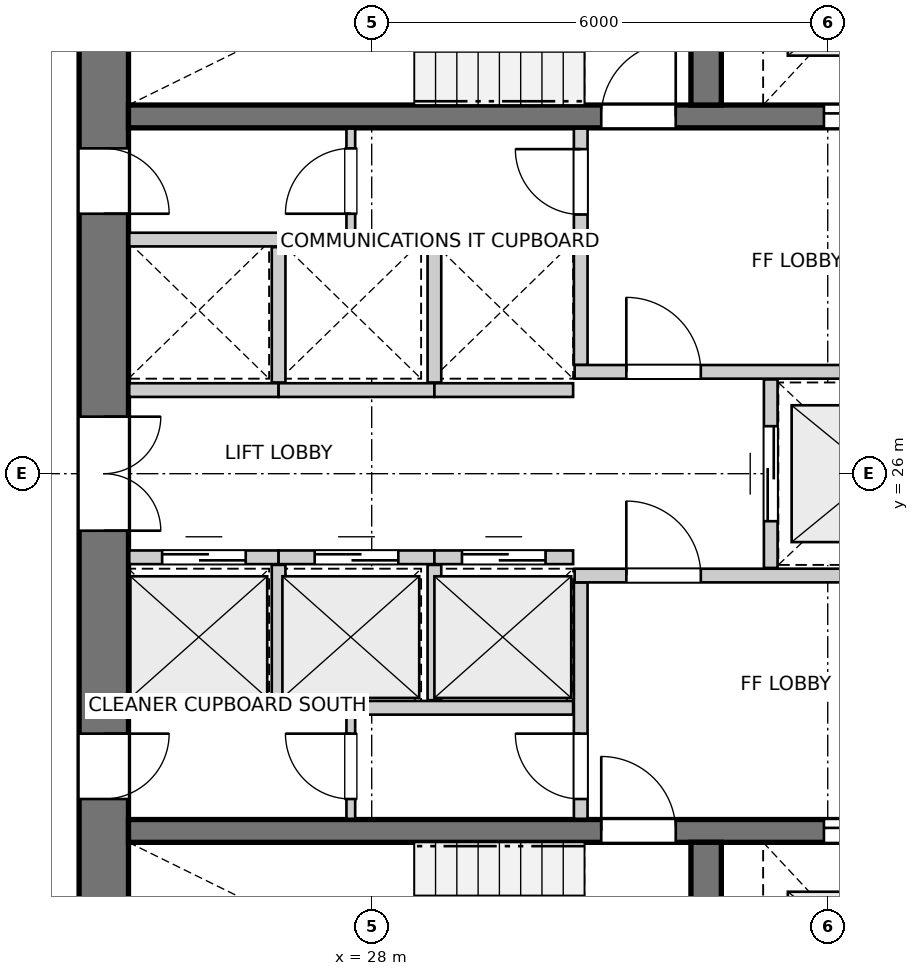
"""IFC4 building model, lengths in metres.
Left out: names, types, materials, properties, quantities, classifications, styles, units other than length and angle.
Written with IfcOpenShell. Run it as: python <this file> out.ifc"""

import sys

from ifc_helpers import new_model, si_unit, direction, frame, frame_2d, origin, place, context, subcontext, project, spatial, rectangle, extrude, source, transform, mapped, element, fill, save


model = new_model("IFC4")
c1 = context("Model", 3, precision=1e-05, world=origin(), true_north=direction((0.0, 1.0)))
c2 = subcontext(c1, "Body", "Model", "MODEL_VIEW")
j1 = project(units=[si_unit("LENGTHUNIT", "METRE"), si_unit("PLANEANGLEUNIT", "RADIAN")], contexts=[c1])
p1 = place(None, origin())
s1 = spatial("IfcSite", under=j1, at=p1, CompositionType="ELEMENT")
p2 = place(p1, origin())
s2 = spatial("IfcBuilding", under=s1, at=p2, CompositionType="ELEMENT")
p3 = place(p2, frame((0.0, 0.0, 86.4)))
s3 = spatial("IfcBuildingStorey", under=s2, at=p3, CompositionType="ELEMENT", Elevation=86.4)
p4 = place(p3, frame((24.475, 33.8, 0.0), z_axis=(0.0, 0.0, 1.0), x_axis=(0.0, -1.0, 0.0)))
e1 = element("IfcWall", 1, at=p4, inside=s3, PredefinedType="SHEAR", context=c2, shape_type="SweptSolid", body=[
    extrude(rectangle(XDim=15.6, YDim=0.65, at=frame_2d((7.8, 0.0))), origin(), (0.0, 0.0, 1.0), 2.95),
])
p5 = place(p4, frame((7.05, 0.0, 0.0)))
e2 = element("IfcOpeningElement", 2, at=p5, cuts=e1, PredefinedType="OPENING", context=c2, shape_type="SweptSolid", body=[
    extrude(rectangle(XDim=1.5, YDim=2.15, at=frame_2d((0.75, 1.075))), frame((0.0, 0.335, 0.0), z_axis=(0.0, -1.0, 0.0), x_axis=(1.0, 0.0, 0.0)), (0.0, 0.0, 1.0), 0.67),
])
p6 = place(p4, frame((3.52, 0.0, 0.0)))
e3 = element("IfcOpeningElement", 3, at=p6, cuts=e1, PredefinedType="OPENING", context=c2, shape_type="SweptSolid", body=[
    extrude(rectangle(XDim=0.86, YDim=2.05, at=frame_2d((0.43, 1.025))), frame((0.0, 0.335, 0.0), z_axis=(0.0, -1.0, 0.0), x_axis=(1.0, 0.0, 0.0)), (0.0, 0.0, 1.0), 0.67),
])
p7 = place(p4, frame((11.22, 0.0, 0.0)))
e4 = element("IfcOpeningElement", 4, at=p7, cuts=e1, PredefinedType="OPENING", context=c2, shape_type="SweptSolid", body=[
    extrude(rectangle(XDim=0.86, YDim=2.05, at=frame_2d((0.43, 1.025))), frame((0.0, 0.335, 0.0), z_axis=(0.0, -1.0, 0.0), x_axis=(1.0, 0.0, 0.0)), (0.0, 0.0, 1.0), 0.67),
])
p8 = place(p3, frame((24.8, 21.3, 0.0), z_axis=(0.0, 0.0, 1.0), x_axis=(1.0, 0.0, 0.0)))
e5 = element("IfcWall", 5, at=p8, inside=s3, PredefinedType="SHEAR", context=c2, shape_type="SweptSolid", body=[
    extrude(rectangle(XDim=11.1, YDim=0.3, at=frame_2d((5.55, 0.0))), origin(), (0.0, 0.0, 1.0), 2.95),
])
p9 = place(p8, frame((6.22, 0.0, 0.0)))
e6 = element("IfcOpeningElement", 6, at=p9, cuts=e5, PredefinedType="OPENING", context=c2, shape_type="SweptSolid", body=[
    extrude(rectangle(XDim=0.98, YDim=2.15, at=frame_2d((0.49, 1.075))), frame((0.0, 0.16, 0.0), z_axis=(0.0, -1.0, 0.0), x_axis=(1.0, 0.0, 0.0)), (0.0, 0.0, 1.0), 0.32),
])
p10 = place(p8, frame((9.15, 0.0, 0.0)))
e7 = element("IfcOpeningElement", 7, at=p10, cuts=e5, PredefinedType="OPENING", context=c2, shape_type="SweptSolid", body=[
    extrude(rectangle(XDim=1.15, YDim=2.15, at=frame_2d((0.575, 1.075))), frame((0.0, 0.16, 0.0), z_axis=(0.0, -1.0, 0.0), x_axis=(1.0, 0.0, 0.0)), (0.0, 0.0, 1.0), 0.32),
])
p11 = place(p3, frame((32.4, 18.2, 0.0), z_axis=(0.0, 0.0, 1.0), x_axis=(0.0, 1.0, 0.0)))
e8 = element("IfcWall", 8, at=p11, inside=s3, PredefinedType="SHEAR", context=c2, shape_type="SweptSolid", body=[
    extrude(rectangle(XDim=2.95, YDim=0.4, at=frame_2d((1.475, 0.0))), origin(), (0.0, 0.0, 1.0), 2.95),
])
p12 = place(p3, frame((24.8, 30.7, 0.0), z_axis=(0.0, 0.0, 1.0), x_axis=(1.0, 0.0, 0.0)))
e9 = element("IfcWall", 9, at=p12, inside=s3, PredefinedType="SHEAR", context=c2, shape_type="SweptSolid", body=[
    extrude(rectangle(XDim=11.1, YDim=0.3, at=frame_2d((5.55, 0.0))), origin(), (0.0, 0.0, 1.0), 2.95),
])
p13 = place(p12, frame((6.22, 0.0, 0.0)))
e10 = element("IfcOpeningElement", 10, at=p13, cuts=e9, PredefinedType="OPENING", context=c2, shape_type="SweptSolid", body=[
    extrude(rectangle(XDim=0.98, YDim=2.15, at=frame_2d((0.49, 1.075))), frame((0.0, 0.16, 0.0), z_axis=(0.0, -1.0, 0.0), x_axis=(1.0, 0.0, 0.0)), (0.0, 0.0, 1.0), 0.32),
])
p14 = place(p12, frame((9.15, 0.0, 0.0)))
e11 = element("IfcOpeningElement", 11, at=p14, cuts=e9, PredefinedType="OPENING", context=c2, shape_type="SweptSolid", body=[
    extrude(rectangle(XDim=1.15, YDim=2.15, at=frame_2d((0.575, 1.075))), frame((0.0, 0.16, 0.0), z_axis=(0.0, -1.0, 0.0), x_axis=(1.0, 0.0, 0.0)), (0.0, 0.0, 1.0), 0.32),
])
p15 = place(p3, frame((32.4, 30.85, 0.0), z_axis=(0.0, 0.0, 1.0), x_axis=(0.0, 1.0, 0.0)))
e12 = element("IfcWall", 12, at=p15, inside=s3, PredefinedType="SHEAR", context=c2, shape_type="SweptSolid", body=[
    extrude(rectangle(XDim=2.95, YDim=0.4, at=frame_2d((1.475, 0.0))), origin(), (0.0, 0.0, 1.0), 2.95),
])
p16 = place(p3, frame((30.75, 21.46, 0.0), z_axis=(0.0, 0.0, 1.0), x_axis=(0.0, 1.0, 0.0)))
e13 = element("IfcWall", 13, at=p16, inside=s3, PredefinedType="PARTITIONING", context=c2, shape_type="SweptSolid", body=[
    extrude(rectangle(XDim=3.11, YDim=0.18, at=frame_2d((1.555, 0.0))), origin(), (0.0, 0.0, 1.0), 2.95),
])
p17 = place(p16, frame((0.26, 0.0, 0.0)))
e14 = element("IfcOpeningElement", 14, at=p17, cuts=e13, PredefinedType="OPENING", context=c2, shape_type="SweptSolid", body=[
    extrude(rectangle(XDim=0.86, YDim=2.05, at=frame_2d((0.43, 1.025))), frame((0.0, 0.1, 0.0), z_axis=(0.0, -1.0, 0.0), x_axis=(1.0, 0.0, 0.0)), (0.0, 0.0, 1.0), 0.2),
])
p18 = place(p3, frame((30.67, 24.66, 0.0), z_axis=(0.0, 0.0, 1.0), x_axis=(1.0, 0.0, 0.0)))
e15 = element("IfcWall", 15, at=p18, inside=s3, PredefinedType="PARTITIONING", context=c2, shape_type="SweptSolid", body=[
    extrude(rectangle(XDim=5.22, YDim=0.18, at=frame_2d((2.61, 0.0))), origin(), (0.0, 0.0, 1.0), 2.95),
])
p19 = place(p18, frame((0.68, 0.0, 0.0)))
e16 = element("IfcOpeningElement", 16, at=p19, cuts=e15, PredefinedType="OPENING", context=c2, shape_type="SweptSolid", body=[
    extrude(rectangle(XDim=0.98, YDim=2.15, at=frame_2d((0.49, 1.075))), frame((0.0, 0.1, 0.0), z_axis=(0.0, -1.0, 0.0), x_axis=(1.0, 0.0, 0.0)), (0.0, 0.0, 1.0), 0.2),
])
p20 = place(p3, frame((30.75, 27.43, 0.0), z_axis=(0.0, 0.0, 1.0), x_axis=(0.0, 1.0, 0.0)))
e17 = element("IfcWall", 17, at=p20, inside=s3, PredefinedType="PARTITIONING", context=c2, shape_type="SweptSolid", body=[
    extrude(rectangle(XDim=3.11, YDim=0.18, at=frame_2d((1.555, 0.0))), origin(), (0.0, 0.0, 1.0), 2.95),
])
p21 = place(p20, frame((1.98, 0.0, 0.0)))
e18 = element("IfcOpeningElement", 18, at=p21, cuts=e17, PredefinedType="OPENING", context=c2, shape_type="SweptSolid", body=[
    extrude(rectangle(XDim=0.86, YDim=2.05, at=frame_2d((0.43, 1.025))), frame((0.0, 0.1, 0.0), z_axis=(0.0, -1.0, 0.0), x_axis=(1.0, 0.0, 0.0)), (0.0, 0.0, 1.0), 0.2),
])
p22 = place(p3, frame((30.67, 27.34, 0.0), z_axis=(0.0, 0.0, 1.0), x_axis=(1.0, 0.0, 0.0)))
e19 = element("IfcWall", 19, at=p22, inside=s3, PredefinedType="PARTITIONING", context=c2, shape_type="SweptSolid", body=[
    extrude(rectangle(XDim=5.22, YDim=0.18, at=frame_2d((2.61, 0.0))), origin(), (0.0, 0.0, 1.0), 2.95),
])
p23 = place(p22, frame((0.68, 0.0, 0.0)))
e20 = element("IfcOpeningElement", 20, at=p23, cuts=e19, PredefinedType="OPENING", context=c2, shape_type="SweptSolid", body=[
    extrude(rectangle(XDim=0.98, YDim=2.15, at=frame_2d((0.49, 1.075))), frame((0.0, 0.1, 0.0), z_axis=(0.0, -1.0, 0.0), x_axis=(1.0, 0.0, 0.0)), (0.0, 0.0, 1.0), 0.2),
])
p24 = place(p3, frame((33.25, 24.76, 0.0), z_axis=(0.0, 0.0, 1.0), x_axis=(0.0, 1.0, 0.0)))
e21 = element("IfcWall", 21, at=p24, inside=s3, PredefinedType="PARTITIONING", context=c2, shape_type="SweptSolid", body=[
    extrude(rectangle(XDim=2.48, YDim=0.18, at=frame_2d((1.24, 0.0))), origin(), (0.0, 0.0, 1.0), 2.95),
])
p25 = place(p24, frame((0.615, 0.0, 0.0)))
e22 = element("IfcOpeningElement", 22, at=p25, cuts=e21, PredefinedType="OPENING", context=c2, shape_type="SweptSolid", body=[
    extrude(rectangle(XDim=1.25, YDim=2.15, at=frame_2d((0.625, 1.075))), frame((0.0, 0.1, 0.0), z_axis=(0.0, -1.0, 0.0), x_axis=(1.0, 0.0, 0.0)), (0.0, 0.0, 1.0), 0.2),
])
p26 = place(p3, frame((24.81, 22.92, 0.0), z_axis=(0.0, 0.0, 1.0), x_axis=(1.0, 0.0, 0.0)))
e23 = element("IfcWall", 23, at=p26, inside=s3, PredefinedType="PARTITIONING", context=c2, shape_type="SweptSolid", body=[
    extrude(rectangle(XDim=5.84, YDim=0.18, at=frame_2d((2.92, 0.0))), origin(), (0.0, 0.0, 1.0), 2.95),
])
p27 = place(p3, frame((24.81, 24.9, 0.0), z_axis=(0.0, 0.0, 1.0), x_axis=(1.0, 0.0, 0.0)))
e24 = element("IfcWall", 24, at=p27, inside=s3, PredefinedType="PARTITIONING", context=c2, shape_type="SweptSolid", body=[
    extrude(rectangle(XDim=1.965, YDim=0.18, at=frame_2d((0.982, 0.0))), origin(), (0.0, 0.0, 1.0), 2.95),
])
p28 = place(p27, frame((0.433, 0.0, 0.0)))
e25 = element("IfcOpeningElement", 25, at=p28, cuts=e24, PredefinedType="OPENING", context=c2, shape_type="SweptSolid", body=[
    extrude(rectangle(XDim=1.1, YDim=2.15, at=frame_2d((0.55, 1.075))), frame((0.0, 0.1, 0.0), z_axis=(0.0, -1.0, 0.0), x_axis=(1.0, 0.0, 0.0)), (0.0, 0.0, 1.0), 0.2),
])
p29 = place(p3, frame((26.775, 24.9, 0.0), z_axis=(0.0, 0.0, 1.0), x_axis=(1.0, 0.0, 0.0)))
e26 = element("IfcWall", 26, at=p29, inside=s3, PredefinedType="PARTITIONING", context=c2, shape_type="SweptSolid", body=[
    extrude(rectangle(XDim=2.05, YDim=0.18, at=frame_2d((1.025, 0.0))), origin(), (0.0, 0.0, 1.0), 2.95),
])
p30 = place(p29, frame((0.475, 0.0, 0.0)))
e27 = element("IfcOpeningElement", 27, at=p30, cuts=e26, PredefinedType="OPENING", context=c2, shape_type="SweptSolid", body=[
    extrude(rectangle(XDim=1.1, YDim=2.15, at=frame_2d((0.55, 1.075))), frame((0.0, 0.1, 0.0), z_axis=(0.0, -1.0, 0.0), x_axis=(1.0, 0.0, 0.0)), (0.0, 0.0, 1.0), 0.2),
])
p31 = place(p3, frame((26.775, 23.02, 0.0), z_axis=(0.0, 0.0, 1.0), x_axis=(0.0, 1.0, 0.0)))
e28 = element("IfcWall", 28, at=p31, inside=s3, PredefinedType="PARTITIONING", context=c2, shape_type="SweptSolid", body=[
    extrude(rectangle(XDim=1.78, YDim=0.18, at=frame_2d((0.89, 0.0))), origin(), (0.0, 0.0, 1.0), 2.95),
])
p32 = place(p3, frame((28.825, 24.9, 0.0), z_axis=(0.0, 0.0, 1.0), x_axis=(1.0, 0.0, 0.0)))
e29 = element("IfcWall", 29, at=p32, inside=s3, PredefinedType="PARTITIONING", context=c2, shape_type="SweptSolid", body=[
    extrude(rectangle(XDim=1.825, YDim=0.18, at=frame_2d((0.913, 0.0))), origin(), (0.0, 0.0, 1.0), 2.95),
])
p33 = place(p32, frame((0.363, 0.0, 0.0)))
e30 = element("IfcOpeningElement", 30, at=p33, cuts=e29, PredefinedType="OPENING", context=c2, shape_type="SweptSolid", body=[
    extrude(rectangle(XDim=1.1, YDim=2.15, at=frame_2d((0.55, 1.075))), frame((0.0, 0.1, 0.0), z_axis=(0.0, -1.0, 0.0), x_axis=(1.0, 0.0, 0.0)), (0.0, 0.0, 1.0), 0.2),
])
p34 = place(p3, frame((28.825, 23.02, 0.0), z_axis=(0.0, 0.0, 1.0), x_axis=(0.0, 1.0, 0.0)))
e31 = element("IfcWall", 31, at=p34, inside=s3, PredefinedType="PARTITIONING", context=c2, shape_type="SweptSolid", body=[
    extrude(rectangle(XDim=1.78, YDim=0.18, at=frame_2d((0.89, 0.0))), origin(), (0.0, 0.0, 1.0), 2.95),
])
p35 = place(p3, frame((24.81, 29.08, 0.0), z_axis=(0.0, 0.0, 1.0), x_axis=(1.0, 0.0, 0.0)))
e32 = element("IfcWall", 32, at=p35, inside=s3, PredefinedType="PARTITIONING", context=c2, shape_type="SweptSolid", body=[
    extrude(rectangle(XDim=5.84, YDim=0.18, at=frame_2d((2.92, 0.0))), origin(), (0.0, 0.0, 1.0), 2.95),
])
p36 = place(p3, frame((24.81, 27.1, 0.0), z_axis=(0.0, 0.0, 1.0), x_axis=(1.0, 0.0, 0.0)))
e33 = element("IfcWall", 33, at=p36, inside=s3, PredefinedType="PARTITIONING", context=c2, shape_type="SweptSolid", body=[
    extrude(rectangle(XDim=1.965, YDim=0.18, at=frame_2d((0.982, 0.0))), origin(), (0.0, 0.0, 1.0), 2.95),
])
p37 = place(p3, frame((26.775, 27.1, 0.0), z_axis=(0.0, 0.0, 1.0), x_axis=(1.0, 0.0, 0.0)))
e34 = element("IfcWall", 34, at=p37, inside=s3, PredefinedType="PARTITIONING", context=c2, shape_type="SweptSolid", body=[
    extrude(rectangle(XDim=2.05, YDim=0.18, at=frame_2d((1.025, 0.0))), origin(), (0.0, 0.0, 1.0), 2.95),
])
p38 = place(p3, frame((26.775, 27.2, 0.0), z_axis=(0.0, 0.0, 1.0), x_axis=(0.0, 1.0, 0.0)))
e35 = element("IfcWall", 35, at=p38, inside=s3, PredefinedType="PARTITIONING", context=c2, shape_type="SweptSolid", body=[
    extrude(rectangle(XDim=1.78, YDim=0.18, at=frame_2d((0.89, 0.0))), origin(), (0.0, 0.0, 1.0), 2.95),
])
p39 = place(p3, frame((28.825, 27.1, 0.0), z_axis=(0.0, 0.0, 1.0), x_axis=(1.0, 0.0, 0.0)))
e36 = element("IfcWall", 36, at=p39, inside=s3, PredefinedType="PARTITIONING", context=c2, shape_type="SweptSolid", body=[
    extrude(rectangle(XDim=1.825, YDim=0.18, at=frame_2d((0.913, 0.0))), origin(), (0.0, 0.0, 1.0), 2.95),
])
p40 = place(p3, frame((28.825, 27.2, 0.0), z_axis=(0.0, 0.0, 1.0), x_axis=(0.0, 1.0, 0.0)))
e37 = element("IfcWall", 37, at=p40, inside=s3, PredefinedType="PARTITIONING", context=c2, shape_type="SweptSolid", body=[
    extrude(rectangle(XDim=1.78, YDim=0.18, at=frame_2d((0.89, 0.0))), origin(), (0.0, 0.0, 1.0), 2.95),
])
p41 = place(p3, frame((27.725, 21.46, 0.0), z_axis=(0.0, 0.0, 1.0), x_axis=(0.0, 1.0, 0.0)))
e38 = element("IfcWall", 38, at=p41, inside=s3, PredefinedType="PARTITIONING", context=c2, shape_type="SweptSolid", body=[
    extrude(rectangle(XDim=1.38, YDim=0.115, at=frame_2d((0.69, 0.0))), origin(), (0.0, 0.0, 1.0), 2.95),
])
p42 = place(p41, frame((0.26, 0.0, 0.0)))
e39 = element("IfcOpeningElement", 39, at=p42, cuts=e38, PredefinedType="OPENING", context=c2, shape_type="SweptSolid", body=[
    extrude(rectangle(XDim=0.86, YDim=2.05, at=frame_2d((0.43, 1.025))), frame((0.0, 0.067, 0.0), z_axis=(0.0, -1.0, 0.0), x_axis=(1.0, 0.0, 0.0)), (0.0, 0.0, 1.0), 0.135),
])
p43 = place(p3, frame((27.725, 29.16, 0.0), z_axis=(0.0, 0.0, 1.0), x_axis=(0.0, 1.0, 0.0)))
e40 = element("IfcWall", 40, at=p43, inside=s3, PredefinedType="PARTITIONING", context=c2, shape_type="SweptSolid", body=[
    extrude(rectangle(XDim=1.38, YDim=0.115, at=frame_2d((0.69, 0.0))), origin(), (0.0, 0.0, 1.0), 2.95),
])
p44 = place(p43, frame((0.26, 0.0, 0.0)))
e41 = element("IfcOpeningElement", 41, at=p44, cuts=e40, PredefinedType="OPENING", context=c2, shape_type="SweptSolid", body=[
    extrude(rectangle(XDim=0.86, YDim=2.05, at=frame_2d((0.43, 1.025))), frame((0.0, 0.067, 0.0), z_axis=(0.0, -1.0, 0.0), x_axis=(1.0, 0.0, 0.0)), (0.0, 0.0, 1.0), 0.135),
])
m1 = source(origin(), c2, "Body", "SweptSolid", [
    extrude(rectangle(XDim=0.98, YDim=2.15, at=frame_2d((0.49, 1.075))), frame((0.0, 0.025, 0.0), z_axis=(0.0, -1.0, 0.0), x_axis=(1.0, 0.0, 0.0)), (0.0, 0.0, 1.0), 0.05),
])
p45 = place(p9, origin())
e42 = element("IfcDoor", 42, at=p45, inside=s3, OperationType="SINGLE_SWING_LEFT", PredefinedType="DOOR", context=c2, shape_type="MappedRepresentation", body=[
    mapped(m1, transform((0.0, 0.0, 0.0), x_axis=(1.0, 0.0, 0.0), y_axis=(0.0, 1.0, 0.0), z_axis=(0.0, 0.0, 1.0), scale=1.0)),
])
fill(e6, e42)
m2 = source(origin(), c2, "Body", "SweptSolid", [
    extrude(rectangle(XDim=1.15, YDim=2.15, at=frame_2d((0.575, 1.075))), frame((0.0, 0.025, 0.0), z_axis=(0.0, -1.0, 0.0), x_axis=(1.0, 0.0, 0.0)), (0.0, 0.0, 1.0), 0.05),
])
p46 = place(p10, origin())
e43 = element("IfcDoor", 43, at=p46, inside=s3, OperationType="DOUBLE_DOOR_SLIDING", PredefinedType="DOOR", context=c2, shape_type="MappedRepresentation", body=[
    mapped(m2, transform((0.0, 0.0, 0.0), x_axis=(1.0, 0.0, 0.0), y_axis=(0.0, 1.0, 0.0), z_axis=(0.0, 0.0, 1.0), scale=1.0)),
])
fill(e7, e43)
p47 = place(p13, origin())
e44 = element("IfcDoor", 44, at=p47, inside=s3, OperationType="SINGLE_SWING_RIGHT", PredefinedType="DOOR", context=c2, shape_type="MappedRepresentation", body=[
    mapped(m1, transform((0.0, 0.0, 0.0), x_axis=(1.0, 0.0, 0.0), y_axis=(0.0, 1.0, 0.0), z_axis=(0.0, 0.0, 1.0), scale=1.0)),
])
fill(e10, e44)
p48 = place(p14, origin())
e45 = element("IfcDoor", 45, at=p48, inside=s3, OperationType="DOUBLE_DOOR_SLIDING", PredefinedType="DOOR", context=c2, shape_type="MappedRepresentation", body=[
    mapped(m2, transform((0.0, 0.0, 0.0), x_axis=(1.0, 0.0, 0.0), y_axis=(0.0, 1.0, 0.0), z_axis=(0.0, 0.0, 1.0), scale=1.0)),
])
fill(e11, e45)
m3 = source(origin(), c2, "Body", "SweptSolid", [
    extrude(rectangle(XDim=1.5, YDim=2.15, at=frame_2d((0.75, 1.075))), frame((0.0, 0.025, 0.0), z_axis=(0.0, -1.0, 0.0), x_axis=(1.0, 0.0, 0.0)), (0.0, 0.0, 1.0), 0.05),
])
p49 = place(p5, origin())
e46 = element("IfcDoor", 46, at=p49, inside=s3, OperationType="DOUBLE_DOOR_SINGLE_SWING", PredefinedType="DOOR", context=c2, shape_type="MappedRepresentation", body=[
    mapped(m3, transform((0.0, 0.0, 0.0), x_axis=(1.0, 0.0, 0.0), y_axis=(0.0, 1.0, 0.0), z_axis=(0.0, 0.0, 1.0), scale=1.0)),
])
fill(e2, e46)
m4 = source(origin(), c2, "Body", "SweptSolid", [
    extrude(rectangle(XDim=0.86, YDim=2.05, at=frame_2d((0.43, 1.025))), frame((0.0, 0.025, 0.0), z_axis=(0.0, -1.0, 0.0), x_axis=(1.0, 0.0, 0.0)), (0.0, 0.0, 1.0), 0.05),
])
p50 = place(p6, origin())
e47 = element("IfcDoor", 47, at=p50, inside=s3, OperationType="SINGLE_SWING_RIGHT", PredefinedType="DOOR", context=c2, shape_type="MappedRepresentation", body=[
    mapped(m4, transform((0.0, 0.0, 0.0), x_axis=(1.0, 0.0, 0.0), y_axis=(0.0, 1.0, 0.0), z_axis=(0.0, 0.0, 1.0), scale=1.0)),
])
fill(e3, e47)
p51 = place(p7, origin())
e48 = element("IfcDoor", 48, at=p51, inside=s3, OperationType="SINGLE_SWING_LEFT", PredefinedType="DOOR", context=c2, shape_type="MappedRepresentation", body=[
    mapped(m4, transform((0.0, 0.0, 0.0), x_axis=(1.0, 0.0, 0.0), y_axis=(0.0, 1.0, 0.0), z_axis=(0.0, 0.0, 1.0), scale=1.0)),
])
fill(e4, e48)
p52 = place(p17, origin())
e49 = element("IfcDoor", 49, at=p52, inside=s3, OperationType="SINGLE_SWING_RIGHT", PredefinedType="DOOR", context=c2, shape_type="MappedRepresentation", body=[
    mapped(m4, transform((0.0, 0.0, 0.0), x_axis=(1.0, 0.0, 0.0), y_axis=(0.0, 1.0, 0.0), z_axis=(0.0, 0.0, 1.0), scale=1.0)),
])
fill(e14, e49)
p53 = place(p19, origin())
e50 = element("IfcDoor", 50, at=p53, inside=s3, OperationType="SINGLE_SWING_LEFT", PredefinedType="DOOR", context=c2, shape_type="MappedRepresentation", body=[
    mapped(m1, transform((0.0, 0.0, 0.0), x_axis=(1.0, 0.0, 0.0), y_axis=(0.0, 1.0, 0.0), z_axis=(0.0, 0.0, 1.0), scale=1.0)),
])
fill(e16, e50)
p54 = place(p21, origin())
e51 = element("IfcDoor", 51, at=p54, inside=s3, OperationType="SINGLE_SWING_RIGHT", PredefinedType="DOOR", context=c2, shape_type="MappedRepresentation", body=[
    mapped(m4, transform((0.0, 0.0, 0.0), x_axis=(1.0, 0.0, 0.0), y_axis=(0.0, 1.0, 0.0), z_axis=(0.0, 0.0, 1.0), scale=1.0)),
])
fill(e18, e51)
p55 = place(p23, origin())
e52 = element("IfcDoor", 52, at=p55, inside=s3, OperationType="SINGLE_SWING_LEFT", PredefinedType="DOOR", context=c2, shape_type="MappedRepresentation", body=[
    mapped(m1, transform((0.0, 0.0, 0.0), x_axis=(1.0, 0.0, 0.0), y_axis=(0.0, 1.0, 0.0), z_axis=(0.0, 0.0, 1.0), scale=1.0)),
])
fill(e20, e52)
m5 = source(origin(), c2, "Body", "SweptSolid", [
    extrude(rectangle(XDim=1.25, YDim=2.15, at=frame_2d((0.625, 1.075))), frame((0.0, 0.025, 0.0), z_axis=(0.0, -1.0, 0.0), x_axis=(1.0, 0.0, 0.0)), (0.0, 0.0, 1.0), 0.05),
])
p56 = place(p25, origin())
e53 = element("IfcDoor", 53, at=p56, inside=s3, OperationType="DOUBLE_DOOR_SLIDING", PredefinedType="DOOR", context=c2, shape_type="MappedRepresentation", body=[
    mapped(m5, transform((0.0, 0.0, 0.0), x_axis=(1.0, 0.0, 0.0), y_axis=(0.0, 1.0, 0.0), z_axis=(0.0, 0.0, 1.0), scale=1.0)),
])
fill(e22, e53)
m6 = source(origin(), c2, "Body", "SweptSolid", [
    extrude(rectangle(XDim=1.1, YDim=2.15, at=frame_2d((0.55, 1.075))), frame((0.0, 0.025, 0.0), z_axis=(0.0, -1.0, 0.0), x_axis=(1.0, 0.0, 0.0)), (0.0, 0.0, 1.0), 0.05),
])
p57 = place(p28, origin())
e54 = element("IfcDoor", 54, at=p57, inside=s3, OperationType="DOUBLE_DOOR_SLIDING", PredefinedType="DOOR", context=c2, shape_type="MappedRepresentation", body=[
    mapped(m6, transform((0.0, 0.0, 0.0), x_axis=(1.0, 0.0, 0.0), y_axis=(0.0, 1.0, 0.0), z_axis=(0.0, 0.0, 1.0), scale=1.0)),
])
fill(e25, e54)
p58 = place(p30, origin())
e55 = element("IfcDoor", 55, at=p58, inside=s3, OperationType="DOUBLE_DOOR_SLIDING", PredefinedType="DOOR", context=c2, shape_type="MappedRepresentation", body=[
    mapped(m6, transform((0.0, 0.0, 0.0), x_axis=(1.0, 0.0, 0.0), y_axis=(0.0, 1.0, 0.0), z_axis=(0.0, 0.0, 1.0), scale=1.0)),
])
fill(e27, e55)
p59 = place(p33, origin())
e56 = element("IfcDoor", 56, at=p59, inside=s3, OperationType="DOUBLE_DOOR_SLIDING", PredefinedType="DOOR", context=c2, shape_type="MappedRepresentation", body=[
    mapped(m6, transform((0.0, 0.0, 0.0), x_axis=(1.0, 0.0, 0.0), y_axis=(0.0, 1.0, 0.0), z_axis=(0.0, 0.0, 1.0), scale=1.0)),
])
fill(e30, e56)
p60 = place(p42, origin())
e57 = element("IfcDoor", 57, at=p60, inside=s3, OperationType="SINGLE_SWING_RIGHT", PredefinedType="DOOR", context=c2, shape_type="MappedRepresentation", body=[
    mapped(m4, transform((0.0, 0.0, 0.0), x_axis=(1.0, 0.0, 0.0), y_axis=(0.0, 1.0, 0.0), z_axis=(0.0, 0.0, 1.0), scale=1.0)),
])
fill(e39, e57)
p61 = place(p44, origin())
e58 = element("IfcDoor", 58, at=p61, inside=s3, OperationType="SINGLE_SWING_LEFT", PredefinedType="DOOR", context=c2, shape_type="MappedRepresentation", body=[
    mapped(m4, transform((0.0, 0.0, 0.0), x_axis=(1.0, 0.0, 0.0), y_axis=(0.0, 1.0, 0.0), z_axis=(0.0, 0.0, 1.0), scale=1.0)),
])
fill(e41, e58)
save(model, sys.argv[1])
